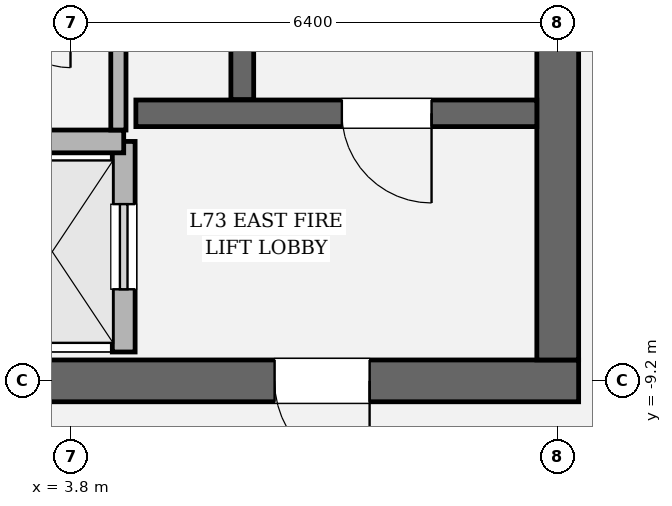
"""IFC4 building model, lengths in metres.
Left out: names, types, materials, properties, quantities, classifications, styles, units other than length and angle.
Written with IfcOpenShell. Run it as: python <this file> out.ifc"""

import sys

from ifc_helpers import new_model, si_unit, direction, frame, frame_2d, origin, place, context, subcontext, project, spatial, rectangle, extrude, element, fill, save


model = new_model("IFC4")
c1 = context("Model", 3, precision=1e-05, world=origin(), true_north=direction((0.0, 1.0)))
c2 = subcontext(c1, "Body", "Model", "MODEL_VIEW")
j1 = project(units=[si_unit("LENGTHUNIT", "METRE"), si_unit("PLANEANGLEUNIT", "RADIAN")], contexts=[c1])
p1 = place(None, origin())
s1 = spatial("IfcSite", under=j1, at=p1, CompositionType="ELEMENT")
p2 = place(p1, origin())
s2 = spatial("IfcBuilding", under=s1, at=p2, CompositionType="ELEMENT")
p3 = place(p2, frame((0.0, 0.0, 309.0)))
s3 = spatial("IfcBuildingStorey", under=s2, at=p3, CompositionType="ELEMENT", Elevation=309.0)
p4 = place(p3, frame((10.475, -9.2, 0.0), z_axis=(0.0, 0.0, 1.0), x_axis=(-1.0, 0.0, 0.0)))
e1 = element("IfcWall", 1, at=p4, inside=s3, PredefinedType="SHEAR", context=c2, shape_type="SweptSolid", body=[
    extrude(rectangle(XDim=20.95, YDim=0.55, at=frame_2d((10.475, 0.0))), origin(), (0.0, 0.0, 1.0), 4.2),
])
p5 = place(p4, frame((2.75, 0.0, 0.0)))
e2 = element("IfcOpeningElement", 2, at=p5, cuts=e1, PredefinedType="OPENING", context=c2, shape_type="SweptSolid", body=[
    extrude(rectangle(XDim=1.25, YDim=2.25, at=frame_2d((0.625, 1.125))), frame((0.0, 0.285, 0.0), z_axis=(0.0, -1.0, 0.0), x_axis=(1.0, 0.0, 0.0)), (0.0, 0.0, 1.0), 0.57),
])
p6 = place(p4, frame((16.95, 0.0, 0.0)))
e3 = element("IfcOpeningElement", 3, at=p6, cuts=e1, PredefinedType="OPENING", context=c2, shape_type="SweptSolid", body=[
    extrude(rectangle(XDim=1.25, YDim=2.25, at=frame_2d((0.625, 1.125))), frame((0.0, 0.285, 0.0), z_axis=(0.0, -1.0, 0.0), x_axis=(1.0, 0.0, 0.0)), (0.0, 0.0, 1.0), 0.57),
])
p7 = place(p3, frame((10.2, 8.925, 0.0), z_axis=(0.0, 0.0, 1.0), x_axis=(0.0, -1.0, 0.0)))
e4 = element("IfcWall", 4, at=p7, inside=s3, PredefinedType="SHEAR", context=c2, shape_type="SweptSolid", body=[
    extrude(rectangle(XDim=17.85, YDim=0.55, at=frame_2d((8.925, 0.0))), origin(), (0.0, 0.0, 1.0), 4.2),
])
p8 = place(p7, frame((3.955, 0.0, 0.0)))
e5 = element("IfcOpeningElement", 5, at=p8, cuts=e4, PredefinedType="OPENING", context=c2, shape_type="SweptSolid", body=[
    extrude(rectangle(XDim=1.18, YDim=2.2, at=frame_2d((0.59, 1.1))), frame((0.0, 0.285, 0.0), z_axis=(0.0, -1.0, 0.0), x_axis=(1.0, 0.0, 0.0)), (0.0, 0.0, 1.0), 0.57),
])
p9 = place(p3, frame((6.05, 3.45, 0.0), z_axis=(0.0, 0.0, 1.0), x_axis=(0.0, -1.0, 0.0)))
e6 = element("IfcWall", 6, at=p9, inside=s3, PredefinedType="SOLIDWALL", context=c2, shape_type="SweptSolid", body=[
    extrude(rectangle(XDim=8.95, YDim=0.3, at=frame_2d((4.475, 0.0))), origin(), (0.0, 0.0, 1.0), 4.2),
])
p10 = place(p3, frame((4.65, -5.68, 0.0), z_axis=(0.0, 0.0, 1.0), x_axis=(1.0, 0.0, 0.0)))
e7 = element("IfcWall", 7, at=p10, inside=s3, PredefinedType="SOLIDWALL", context=c2, shape_type="SweptSolid", body=[
    extrude(rectangle(XDim=5.275, YDim=0.35, at=frame_2d((2.638, 0.0))), origin(), (0.0, 0.0, 1.0), 4.2),
])
p11 = place(p10, frame((2.71, 0.0, 0.0)))
e8 = element("IfcOpeningElement", 8, at=p11, cuts=e7, PredefinedType="OPENING", context=c2, shape_type="SweptSolid", body=[
    extrude(rectangle(XDim=1.18, YDim=2.2, at=frame_2d((0.59, 1.1))), frame((0.0, 0.185, 0.0), z_axis=(0.0, -1.0, 0.0), x_axis=(1.0, 0.0, 0.0)), (0.0, 0.0, 1.0), 0.37),
])
p12 = place(p3, frame((4.49, -8.82, 0.0), z_axis=(0.0, 0.0, 1.0), x_axis=(0.0, 1.0, 0.0)))
e9 = element("IfcWall", 9, at=p12, inside=s3, PredefinedType="SOLIDWALL", context=c2, shape_type="SweptSolid", body=[
    extrude(rectangle(XDim=2.77, YDim=0.3, at=frame_2d((1.385, 0.0))), origin(), (0.0, 0.0, 1.0), 4.0),
])
p13 = place(p12, frame((0.825, 0.0, 0.0)))
e10 = element("IfcOpeningElement", 10, at=p13, cuts=e9, PredefinedType="OPENING", context=c2, shape_type="SweptSolid", body=[
    extrude(rectangle(XDim=1.12, YDim=2.25, at=frame_2d((0.56, 1.125))), frame((0.0, 0.16, 0.0), z_axis=(0.0, -1.0, 0.0), x_axis=(1.0, 0.0, 0.0)), (0.0, 0.0, 1.0), 0.32),
])
p14 = place(p3, frame((2.61, -6.05, 0.0), z_axis=(0.0, 0.0, 1.0), x_axis=(1.0, 0.0, 0.0)))
e11 = element("IfcWall", 11, at=p14, inside=s3, PredefinedType="SOLIDWALL", context=c2, shape_type="SweptSolid", body=[
    extrude(rectangle(XDim=1.88, YDim=0.3, at=frame_2d((0.94, 0.0))), origin(), (0.0, 0.0, 1.0), 4.0),
])
p15 = place(p3, frame((4.42, -5.9, 0.0), z_axis=(0.0, 0.0, 1.0), x_axis=(0.0, 1.0, 0.0)))
e12 = element("IfcWall", 12, at=p15, inside=s3, PredefinedType="SOLIDWALL", context=c2, shape_type="SweptSolid", body=[
    extrude(rectangle(XDim=1.74, YDim=0.2, at=frame_2d((0.87, 0.0))), origin(), (0.0, 0.0, 1.0), 4.0),
])
p16 = place(p11, origin())
e13 = element("IfcDoor", 13, at=p16, inside=s3, OperationType="SINGLE_SWING_RIGHT", PredefinedType="DOOR", context=c2, shape_type="SweptSolid", body=[
    extrude(rectangle(XDim=1.18, YDim=2.2, at=frame_2d((0.59, 1.1))), frame((0.0, 0.025, 0.0), z_axis=(0.0, -1.0, 0.0), x_axis=(1.0, 0.0, 0.0)), (0.0, 0.0, 1.0), 0.05),
])
fill(e8, e13)
p17 = place(p5, origin())
e14 = element("IfcDoor", 14, at=p17, inside=s3, OperationType="SINGLE_SWING_LEFT", PredefinedType="DOOR", context=c2, shape_type="SweptSolid", body=[
    extrude(rectangle(XDim=1.25, YDim=2.25, at=frame_2d((0.625, 1.125))), frame((0.0, 0.025, 0.0), z_axis=(0.0, -1.0, 0.0), x_axis=(1.0, 0.0, 0.0)), (0.0, 0.0, 1.0), 0.05),
])
fill(e2, e14)
p18 = place(p13, origin())
e15 = element("IfcDoor", 15, at=p18, inside=s3, OperationType="SLIDING_TO_RIGHT", PredefinedType="DOOR", context=c2, shape_type="SweptSolid", body=[
    extrude(rectangle(XDim=1.12, YDim=2.25, at=frame_2d((0.56, 1.125))), frame((0.0, 0.025, 0.0), z_axis=(0.0, -1.0, 0.0), x_axis=(1.0, 0.0, 0.0)), (0.0, 0.0, 1.0), 0.05),
])
fill(e10, e15)
save(model, sys.argv[1])
